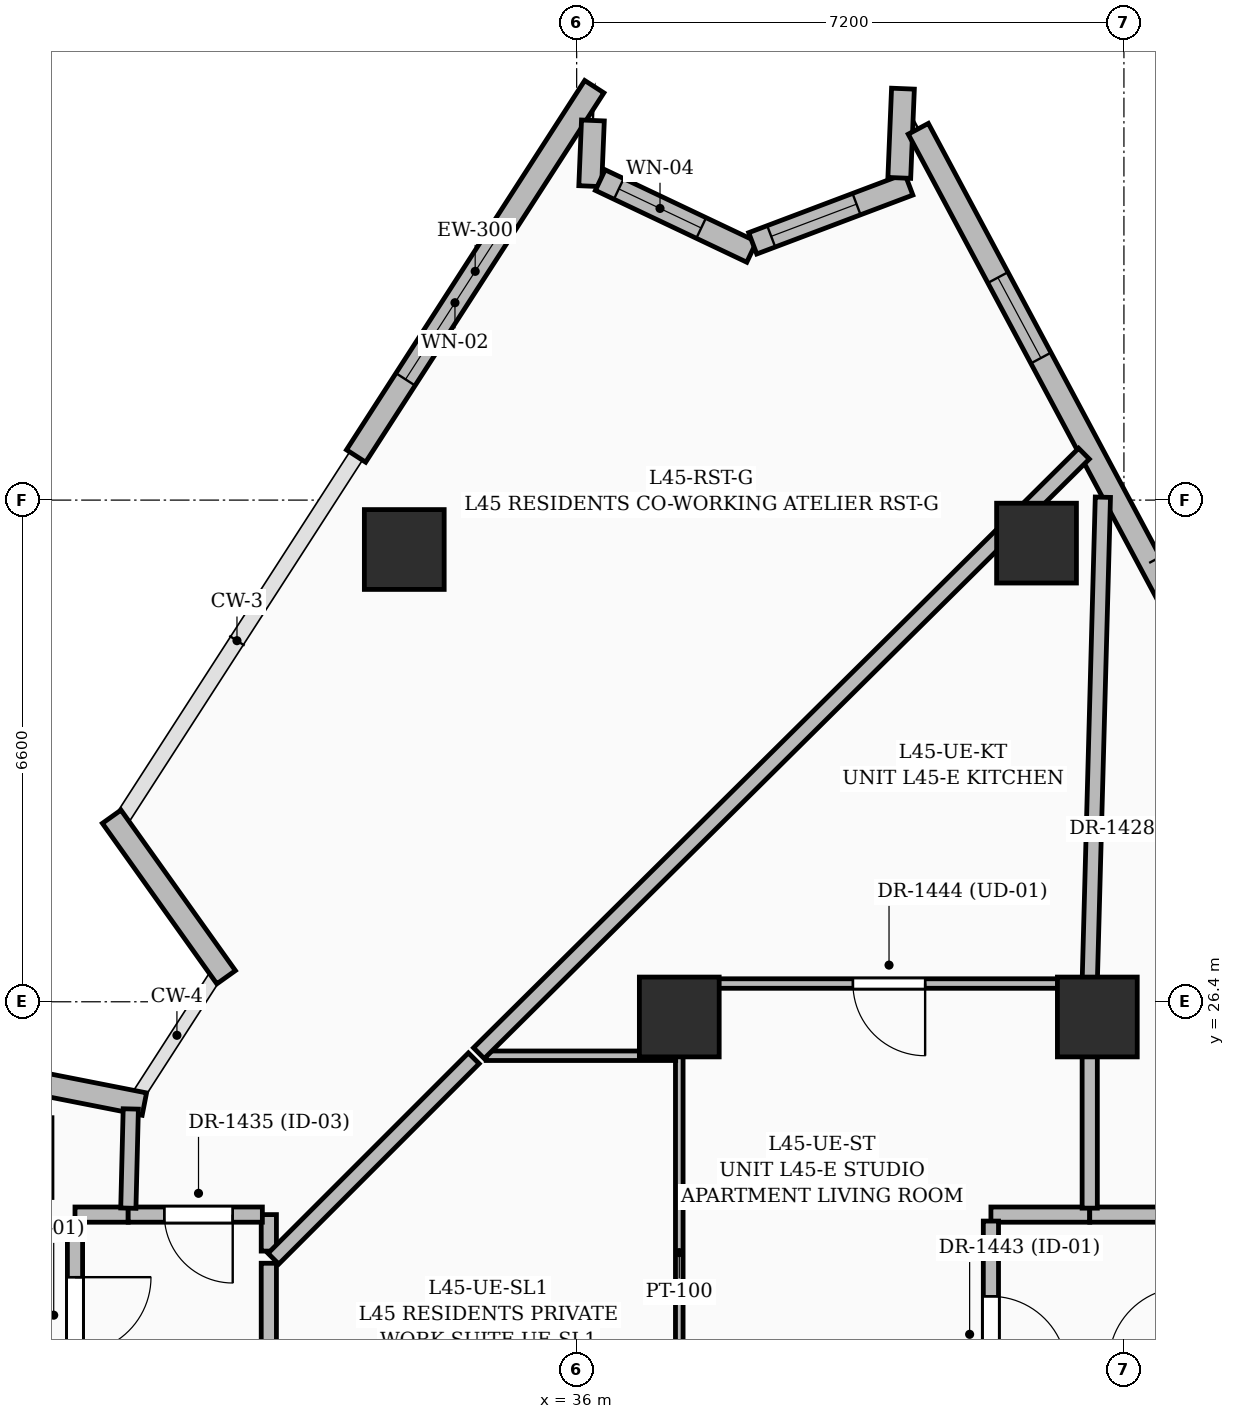
"""IFC4 building model, lengths in metres.
Left out: names, types, materials, properties, quantities, classifications, styles, units other than length and angle.
Written with IfcOpenShell. Run it as: python <this file> out.ifc"""

import sys

from ifc_helpers import new_model, si_unit, direction, frame, frame_2d, origin, origin_2d, place, context, subcontext, project, spatial, rectangle, extrude, element, fill, save


model = new_model("IFC4")
c1 = context("Model", 3, precision=1e-05, world=origin(), true_north=direction((0.0, 1.0)))
c2 = subcontext(c1, "Body", "Model", "MODEL_VIEW")
j1 = project(units=[si_unit("LENGTHUNIT", "METRE"), si_unit("PLANEANGLEUNIT", "RADIAN")], contexts=[c1])
p1 = place(None, origin())
s1 = spatial("IfcSite", under=j1, at=p1, CompositionType="ELEMENT")
p2 = place(p1, origin())
s2 = spatial("IfcBuilding", under=s1, at=p2, CompositionType="ELEMENT")
p3 = place(p2, frame((0.0, 0.0, 175.2)))
s3 = spatial("IfcBuildingStorey", under=s2, at=p3, CompositionType="ELEMENT", Elevation=175.2)
for number, where, z_axis, x_axis in (
    (1, (42.85, 26.2, 0.0), (0.0, 0.0, 1.0), (1.0, 0.0, 0.0)),
    (2, (37.35, 26.2, 0.0), (0.0, 0.0, 1.0), (1.0, 0.0, 0.0)),
    (3, (42.05, 32.434, 0.0), (0.0, 0.0, 1.0), (1.0, 0.0, 0.0)),
    (4, (33.732, 32.35, 0.0), (0.0, 0.0, 1.0), (1.0, 0.0, 0.0)),
):
    element("IfcColumn", number, at=place(p3, frame(where, z_axis=z_axis, x_axis=x_axis)), inside=s3, PredefinedType="COLUMN", context=c2, shape_type="SweptSolid", body=[
        extrude(rectangle(XDim=1.05, YDim=1.05, at=origin_2d()), origin(), (0.0, 0.0, 1.0), 3.6),
    ])
p4 = place(p3, frame((27.767, 25.555, 0.0), z_axis=(0.0, 0.0, 1.0), x_axis=(0.981183938234, -0.193075320412, 0.0)))
e5 = element("IfcWall", 5, at=p4, inside=s3, PredefinedType="SOLIDWALL", context=c2, shape_type="SweptSolid", body=[
    extrude(rectangle(XDim=2.595, YDim=0.3, at=frame_2d((1.297, 0.0))), origin(), (0.0, 0.0, 1.0), 2.575),
])
p5 = place(p3, frame((31.388, 26.723, 0.0), z_axis=(0.0, 0.0, 1.0), x_axis=(-0.580409797139, 0.814324546716, 0.0)))
e6 = element("IfcWall", 6, at=p5, inside=s3, PredefinedType="SOLIDWALL", context=c2, shape_type="SweptSolid", body=[
    extrude(rectangle(XDim=2.594, YDim=0.3, at=frame_2d((1.297, 0.0))), origin(), (0.0, 0.0, 1.0), 2.575),
])
p6 = place(p3, frame((33.098, 33.58, 0.0), z_axis=(0.0, 0.0, 1.0), x_axis=(0.542037422538, 0.840354349408, 0.0)))
e7 = element("IfcWall", 7, at=p6, inside=s3, PredefinedType="SOLIDWALL", context=c2, shape_type="SweptSolid", body=[
    extrude(rectangle(XDim=5.782, YDim=0.3, at=frame_2d((2.891, 0.0))), origin(), (0.0, 0.0, 1.0), 3.35),
])
p7 = place(p6, frame((1.2, 0.0, 0.6)))
e8 = element("IfcOpeningElement", 8, at=p7, cuts=e7, PredefinedType="OPENING", context=c2, shape_type="SweptSolid", body=[
    extrude(rectangle(XDim=2.4, YDim=2.1, at=frame_2d((1.2, 1.05))), frame((0.0, 0.16, 0.0), z_axis=(0.0, -1.0, 0.0), x_axis=(1.0, 0.0, 0.0)), (0.0, 0.0, 1.0), 0.32),
])
p8 = place(p3, frame((36.214, 37.994, 0.0), z_axis=(0.0, 0.0, 1.0), x_axis=(-0.040926134278, -0.999162174791, 0.0)))
e9 = element("IfcWall", 9, at=p8, inside=s3, PredefinedType="SOLIDWALL", context=c2, shape_type="SweptSolid", body=[
    extrude(rectangle(XDim=0.865, YDim=0.3, at=frame_2d((0.433, 0.0))), origin(), (0.0, 0.0, 1.0), 3.35),
])
p9 = place(p3, frame((36.311, 37.21, 0.0), z_axis=(0.0, 0.0, 1.0), x_axis=(0.903471604204, -0.428647944585, 0.0)))
e10 = element("IfcWall", 10, at=p9, inside=s3, PredefinedType="SOLIDWALL", context=c2, shape_type="SweptSolid", body=[
    extrude(rectangle(XDim=2.205, YDim=0.3, at=frame_2d((1.103, 0.0))), origin(), (0.0, 0.0, 1.0), 3.35),
])
p10 = place(p9, frame((0.27, 0.0, 0.8)))
e11 = element("IfcOpeningElement", 11, at=p10, cuts=e10, PredefinedType="OPENING", context=c2, shape_type="SweptSolid", body=[
    extrude(rectangle(XDim=1.2, YDim=1.8, at=frame_2d((0.6, 0.9))), frame((0.0, 0.16, 0.0), z_axis=(0.0, -1.0, 0.0), x_axis=(1.0, 0.0, 0.0)), (0.0, 0.0, 1.0), 0.32),
])
p11 = place(p3, frame((38.316, 36.378, 0.0), z_axis=(0.0, 0.0, 1.0), x_axis=(0.935503953589, 0.353316222129, 0.0)))
e12 = element("IfcWall", 12, at=p11, inside=s3, PredefinedType="SOLIDWALL", context=c2, shape_type="SweptSolid", body=[
    extrude(rectangle(XDim=2.195, YDim=0.3, at=frame_2d((1.098, 0.0))), origin(), (0.0, 0.0, 1.0), 3.35),
])
p12 = place(p11, frame((0.26, 0.0, 0.8)))
e13 = element("IfcOpeningElement", 13, at=p12, cuts=e12, PredefinedType="OPENING", context=c2, shape_type="SweptSolid", body=[
    extrude(rectangle(XDim=1.2, YDim=1.8, at=frame_2d((0.6, 0.9))), frame((0.0, 0.16, 0.0), z_axis=(0.0, -1.0, 0.0), x_axis=(1.0, 0.0, 0.0)), (0.0, 0.0, 1.0), 0.32),
])
p13 = place(p3, frame((40.245, 37.239, 0.0), z_axis=(0.0, 0.0, 1.0), x_axis=(0.040939027533, 0.999161646594, 0.0)))
e14 = element("IfcWall", 14, at=p13, inside=s3, PredefinedType="SOLIDWALL", context=c2, shape_type="SweptSolid", body=[
    extrude(rectangle(XDim=1.175, YDim=0.3, at=frame_2d((0.587, 0.0))), origin(), (0.0, 0.0, 1.0), 3.35),
])
p14 = place(p3, frame((40.495, 37.885, 0.0), z_axis=(0.0, 0.0, 1.0), x_axis=(0.471731834897, -0.88174206883, 0.0)))
e15 = element("IfcWall", 15, at=p14, inside=s3, PredefinedType="SOLIDWALL", context=c2, shape_type="SweptSolid", body=[
    extrude(rectangle(XDim=7.1, YDim=0.3, at=frame_2d((3.55, 0.0))), origin(), (0.0, 0.0, 1.0), 3.35),
])
p15 = place(p14, frame((2.22, 0.0, 0.8)))
e16 = element("IfcOpeningElement", 16, at=p15, cuts=e15, PredefinedType="OPENING", context=c2, shape_type="SweptSolid", body=[
    extrude(rectangle(XDim=1.2, YDim=1.8, at=frame_2d((0.6, 0.9))), frame((0.0, 0.16, 0.0), z_axis=(0.0, -1.0, 0.0), x_axis=(1.0, 0.0, 0.0)), (0.0, 0.0, 1.0), 0.32),
])
p16 = place(p3, frame((30.1, 23.6, 0.0), z_axis=(0.0, 0.0, 1.0), x_axis=(-1.0, 0.0, 0.0)))
e17 = element("IfcWall", 17, at=p16, inside=s3, PredefinedType="PARTITIONING", context=c2, shape_type="SweptSolid", body=[
    extrude(rectangle(XDim=0.7, YDim=0.2, at=frame_2d((0.35, 0.0))), origin(), (0.0, 0.0, 1.0), 2.464),
])
p17 = place(p3, frame((29.4, 23.515, 0.0), z_axis=(0.0, 0.0, 1.0), x_axis=(0.0, -1.0, 0.0)))
e18 = element("IfcWall", 18, at=p17, inside=s3, PredefinedType="PARTITIONING", context=c2, shape_type="SweptSolid", body=[
    extrude(rectangle(XDim=2.675, YDim=0.2, at=frame_2d((1.337, 0.0))), origin(), (0.0, 0.0, 1.0), 2.464),
])
p18 = place(p17, frame((0.738, 0.0, 0.0)))
e19 = element("IfcOpeningElement", 19, at=p18, cuts=e18, PredefinedType="OPENING", context=c2, shape_type="SweptSolid", body=[
    extrude(rectangle(XDim=1.0, YDim=2.2, at=frame_2d((0.5, 1.1))), frame((0.0, 0.11, 0.0), z_axis=(0.0, -1.0, 0.0), x_axis=(1.0, 0.0, 0.0)), (0.0, 0.0, 1.0), 0.22),
])
p19 = place(p3, frame((42.75, 23.6, 0.0), z_axis=(0.0, 0.0, 1.0), x_axis=(-1.0, 0.0, 0.0)))
e20 = element("IfcWall", 20, at=p19, inside=s3, PredefinedType="PARTITIONING", context=c2, shape_type="SweptSolid", body=[
    extrude(rectangle(XDim=1.3, YDim=0.2, at=frame_2d((0.65, 0.0))), origin(), (0.0, 0.0, 1.0), 3.35),
])
p20 = place(p3, frame((41.45, 23.515, 0.0), z_axis=(0.0, 0.0, 1.0), x_axis=(0.0, -1.0, 0.0)))
e21 = element("IfcWall", 21, at=p20, inside=s3, PredefinedType="PARTITIONING", context=c2, shape_type="SweptSolid", body=[
    extrude(rectangle(XDim=3.065, YDim=0.2, at=frame_2d((1.532, 0.0))), origin(), (0.0, 0.0, 1.0), 3.35),
])
p21 = place(p20, frame((0.99, 0.0, 0.0)))
e22 = element("IfcOpeningElement", 22, at=p21, cuts=e21, PredefinedType="OPENING", context=c2, shape_type="SweptSolid", body=[
    extrude(rectangle(XDim=1.0, YDim=2.2, at=frame_2d((0.5, 1.1))), frame((0.0, 0.11, 0.0), z_axis=(0.0, -1.0, 0.0), x_axis=(1.0, 0.0, 0.0)), (0.0, 0.0, 1.0), 0.22),
])
p22 = place(p3, frame((31.95, 19.42, 0.0), z_axis=(0.0, 0.0, 1.0), x_axis=(0.0, 1.0, 0.0)))
e23 = element("IfcWall", 23, at=p22, inside=s3, PredefinedType="PARTITIONING", context=c2, shape_type="SweptSolid", body=[
    extrude(rectangle(XDim=3.54, YDim=0.2, at=frame_2d((1.77, 0.0))), origin(), (0.0, 0.0, 1.0), 2.464),
])
p23 = place(p3, frame((43.915, 23.6, 0.0), z_axis=(0.0, 0.0, 1.0), x_axis=(-1.0, 0.0, 0.0)))
e24 = element("IfcWall", 24, at=p23, inside=s3, PredefinedType="PARTITIONING", context=c2, shape_type="SweptSolid", body=[
    extrude(rectangle(XDim=1.165, YDim=0.2, at=frame_2d((0.583, 0.0))), origin(), (0.0, 0.0, 1.0), 2.436),
])
p24 = place(p3, frame((31.95, 23.12, 0.0), z_axis=(0.0, 0.0, 1.0), x_axis=(0.0, 1.0, 0.0)))
e25 = element("IfcWall", 25, at=p24, inside=s3, PredefinedType="PARTITIONING", context=c2, shape_type="SweptSolid", body=[
    extrude(rectangle(XDim=0.48, YDim=0.2, at=frame_2d((0.24, 0.0))), origin(), (0.0, 0.0, 1.0), 2.86),
])
p25 = place(p3, frame((31.865, 23.6, 0.0), z_axis=(0.0, 0.0, 1.0), x_axis=(-1.0, 0.0, 0.0)))
e26 = element("IfcWall", 26, at=p25, inside=s3, PredefinedType="PARTITIONING", context=c2, shape_type="SweptSolid", body=[
    extrude(rectangle(XDim=1.765, YDim=0.2, at=frame_2d((0.882, 0.0))), origin(), (0.0, 0.0, 1.0), 3.35),
])
p26 = place(p25, frame((0.39, 0.0, 0.0)))
e27 = element("IfcOpeningElement", 27, at=p26, cuts=e26, PredefinedType="OPENING", context=c2, shape_type="SweptSolid", body=[
    extrude(rectangle(XDim=0.9, YDim=2.1, at=frame_2d((0.45, 1.05))), frame((0.0, 0.11, 0.0), z_axis=(0.0, -1.0, 0.0), x_axis=(1.0, 0.0, 0.0)), (0.0, 0.0, 1.0), 0.22),
])
p27 = place(p3, frame((30.102, 23.685, 0.0), z_axis=(0.0, 0.0, 1.0), x_axis=(0.024688450061, 0.999695193763, 0.0)))
e28 = element("IfcWall", 28, at=p27, inside=s3, PredefinedType="PARTITIONING", context=c2, shape_type="SweptSolid", body=[
    extrude(rectangle(XDim=1.305, YDim=0.2, at=frame_2d((0.653, 0.0))), origin(), (0.0, 0.0, 1.0), 3.35),
])
p28 = place(p3, frame((42.75, 26.64, 0.0), z_axis=(0.0, 0.0, 1.0), x_axis=(-1.0, 0.0, 0.0)))
e29 = element("IfcWall", 29, at=p28, inside=s3, PredefinedType="PARTITIONING", context=c2, shape_type="SweptSolid", body=[
    extrude(rectangle(XDim=5.4, YDim=0.125, at=frame_2d((2.7, 0.0))), origin(), (0.0, 0.0, 1.0), 3.35),
])
p29 = place(p28, frame((2.165, 0.0, 0.0)))
e30 = element("IfcOpeningElement", 30, at=p29, cuts=e29, PredefinedType="OPENING", context=c2, shape_type="SweptSolid", body=[
    extrude(rectangle(XDim=0.95, YDim=2.2, at=frame_2d((0.475, 1.1))), frame((0.0, 0.072, 0.0), z_axis=(0.0, -1.0, 0.0), x_axis=(1.0, 0.0, 0.0)), (0.0, 0.0, 1.0), 0.145),
])
p30 = place(p3, frame((37.35, 26.593, 0.0), z_axis=(0.0, 0.0, 1.0), x_axis=(0.0, -1.0, 0.0)))
e31 = element("IfcWall", 31, at=p30, inside=s3, PredefinedType="PARTITIONING", context=c2, shape_type="SweptSolid", body=[
    extrude(rectangle(XDim=0.903, YDim=0.125, at=frame_2d((0.451, 0.0))), origin(), (0.0, 0.0, 1.0), 3.35),
])
p31 = place(p3, frame((37.35, 25.69, 0.0), z_axis=(0.0, 0.0, 1.0), x_axis=(0.0, -1.0, 0.0)))
e32 = element("IfcWall", 32, at=p31, inside=s3, PredefinedType="PARTITIONING", context=c2, shape_type="SweptSolid", body=[
    extrude(rectangle(XDim=5.18, YDim=0.1, at=frame_2d((2.59, 0.0))), origin(), (0.0, 0.0, 1.0), 3.35),
])
p32 = place(p3, frame((42.75, 23.685, 0.0), z_axis=(0.0, 0.0, 1.0), x_axis=(0.0, 1.0, 0.0)))
e33 = element("IfcWall", 33, at=p32, inside=s3, PredefinedType="PARTITIONING", context=c2, shape_type="SweptSolid", body=[
    extrude(rectangle(XDim=2.907, YDim=0.2, at=frame_2d((1.454, 0.0))), origin(), (0.0, 0.0, 1.0), 3.35),
])
p33 = place(p3, frame((34.81, 25.69, 0.0), z_axis=(0.0, 0.0, 1.0), x_axis=(1.0, 0.0, 0.0)))
e34 = element("IfcWall", 34, at=p33, inside=s3, PredefinedType="PARTITIONING", context=c2, shape_type="SweptSolid", body=[
    extrude(rectangle(XDim=2.492, YDim=0.125, at=frame_2d((1.246, 0.0))), origin(), (0.0, 0.0, 1.0), 2.436),
])
p34 = place(p3, frame((42.751, 26.688, 0.0), z_axis=(0.0, 0.0, 1.0), x_axis=(0.027092926653, 0.999632919289, 0.0)))
e35 = element("IfcWall", 35, at=p34, inside=s3, PredefinedType="PARTITIONING", context=c2, shape_type="SweptSolid", body=[
    extrude(rectangle(XDim=6.353, YDim=0.2, at=frame_2d((3.177, 0.0))), origin(), (0.0, 0.0, 1.0), 2.464),
])
p35 = place(p3, frame((42.674, 33.611, 0.0), z_axis=(0.0, 0.0, 1.0), x_axis=(-0.710345403642, -0.703853257096, 0.0)))
e36 = element("IfcWall", 36, at=p35, inside=s3, PredefinedType="PARTITIONING", context=c2, shape_type="SweptSolid", body=[
    extrude(rectangle(XDim=11.207, YDim=0.2, at=frame_2d((5.603, 0.0))), origin(), (0.0, 0.0, 1.0), 2.464),
])
p36 = place(p3, frame((34.646, 25.656, 0.0), z_axis=(0.0, 0.0, 1.0), x_axis=(-0.707106781187, -0.707106781187, 0.0)))
e37 = element("IfcWall", 37, at=p36, inside=s3, PredefinedType="PARTITIONING", context=c2, shape_type="SweptSolid", body=[
    extrude(rectangle(XDim=3.729, YDim=0.2, at=frame_2d((1.864, 0.0))), origin(), (0.0, 0.0, 1.0), 2.86),
])
p37 = place(p7, origin())
e38 = element("IfcWindow", 38, at=p37, inside=s3, PartitioningType="SINGLE_PANEL", PredefinedType="WINDOW", context=c2, shape_type="SweptSolid", body=[
    extrude(rectangle(XDim=2.4, YDim=2.1, at=frame_2d((1.2, 1.05))), frame((0.0, 0.03, 0.0), z_axis=(0.0, -1.0, 0.0), x_axis=(1.0, 0.0, 0.0)), (0.0, 0.0, 1.0), 0.06),
])
fill(e8, e38)
p38 = place(p10, origin())
e39 = element("IfcWindow", 39, at=p38, inside=s3, PartitioningType="SINGLE_PANEL", PredefinedType="WINDOW", context=c2, shape_type="SweptSolid", body=[
    extrude(rectangle(XDim=1.2, YDim=1.8, at=frame_2d((0.6, 0.9))), frame((0.0, 0.03, 0.0), z_axis=(0.0, -1.0, 0.0), x_axis=(1.0, 0.0, 0.0)), (0.0, 0.0, 1.0), 0.06),
])
fill(e11, e39)
p39 = place(p12, origin())
e40 = element("IfcWindow", 40, at=p39, inside=s3, PartitioningType="SINGLE_PANEL", PredefinedType="WINDOW", context=c2, shape_type="SweptSolid", body=[
    extrude(rectangle(XDim=1.2, YDim=1.8, at=frame_2d((0.6, 0.9))), frame((0.0, 0.03, 0.0), z_axis=(0.0, -1.0, 0.0), x_axis=(1.0, 0.0, 0.0)), (0.0, 0.0, 1.0), 0.06),
])
fill(e13, e40)
p40 = place(p15, origin())
e41 = element("IfcWindow", 41, at=p40, inside=s3, PartitioningType="SINGLE_PANEL", PredefinedType="WINDOW", context=c2, shape_type="SweptSolid", body=[
    extrude(rectangle(XDim=1.2, YDim=1.8, at=frame_2d((0.6, 0.9))), frame((0.0, 0.03, 0.0), z_axis=(0.0, -1.0, 0.0), x_axis=(1.0, 0.0, 0.0)), (0.0, 0.0, 1.0), 0.06),
])
fill(e16, e41)
p41 = place(p26, origin())
e42 = element("IfcDoor", 42, at=p41, inside=s3, OperationType="SINGLE_SWING_LEFT", PredefinedType="DOOR", context=c2, shape_type="SweptSolid", body=[
    extrude(rectangle(XDim=0.9, YDim=2.1, at=frame_2d((0.45, 1.05))), frame((0.0, 0.025, 0.0), z_axis=(0.0, -1.0, 0.0), x_axis=(1.0, 0.0, 0.0)), (0.0, 0.0, 1.0), 0.05),
])
fill(e27, e42)
p42 = place(p18, origin())
e43 = element("IfcDoor", 43, at=p42, inside=s3, OperationType="SINGLE_SWING_LEFT", PredefinedType="DOOR", context=c2, shape_type="SweptSolid", body=[
    extrude(rectangle(XDim=1.0, YDim=2.2, at=frame_2d((0.5, 1.1))), frame((0.0, 0.025, 0.0), z_axis=(0.0, -1.0, 0.0), x_axis=(1.0, 0.0, 0.0)), (0.0, 0.0, 1.0), 0.05),
])
fill(e19, e43)
p43 = place(p21, origin())
e44 = element("IfcDoor", 44, at=p43, inside=s3, OperationType="SINGLE_SWING_RIGHT", PredefinedType="DOOR", context=c2, shape_type="SweptSolid", body=[
    extrude(rectangle(XDim=1.0, YDim=2.2, at=frame_2d((0.5, 1.1))), frame((0.0, 0.025, 0.0), z_axis=(0.0, -1.0, 0.0), x_axis=(1.0, 0.0, 0.0)), (0.0, 0.0, 1.0), 0.05),
])
fill(e22, e44)
p44 = place(p29, origin())
e45 = element("IfcDoor", 45, at=p44, inside=s3, OperationType="SINGLE_SWING_LEFT", PredefinedType="DOOR", context=c2, shape_type="SweptSolid", body=[
    extrude(rectangle(XDim=0.95, YDim=2.2, at=frame_2d((0.475, 1.1))), frame((0.0, 0.025, 0.0), z_axis=(0.0, -1.0, 0.0), x_axis=(1.0, 0.0, 0.0)), (0.0, 0.0, 1.0), 0.05),
])
fill(e30, e45)
save(model, sys.argv[1])
